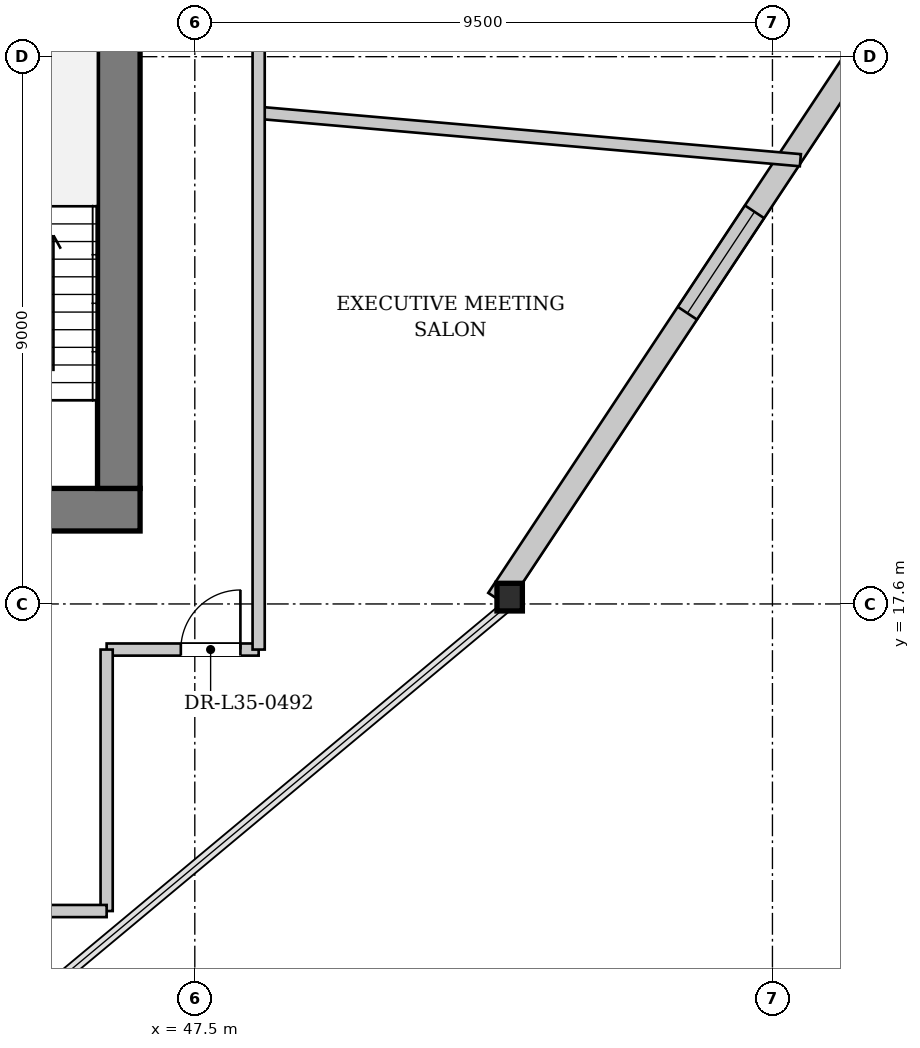
"""IFC4 building model, lengths in metres.
Left out: names, types, materials, properties, quantities, classifications, styles, units other than length and angle.
Written with IfcOpenShell. Run it as: python <this file> out.ifc"""

import sys

from ifc_helpers import new_model, si_unit, direction, frame, frame_2d, origin, origin_2d, place, context, subcontext, project, spatial, rectangle, i_section, extrude, source, transform, mapped, element, fill, save


model = new_model("IFC4")
c1 = context("Model", 3, precision=1e-05, world=origin(), true_north=direction((0.0, 1.0)))
c2 = subcontext(c1, "Body", "Model", "MODEL_VIEW")
j1 = project(units=[si_unit("LENGTHUNIT", "METRE"), si_unit("PLANEANGLEUNIT", "RADIAN")], contexts=[c1])
p1 = place(None, origin())
s1 = spatial("IfcSite", under=j1, at=p1, CompositionType="ELEMENT")
p2 = place(p1, origin())
s2 = spatial("IfcBuilding", under=s1, at=p2, CompositionType="ELEMENT")
p3 = place(p2, frame((0.0, 0.0, 134.1)))
s3 = spatial("IfcBuildingStorey", under=s2, at=p3, CompositionType="ELEMENT", Elevation=134.1)
m1 = source(origin(), c2, "Body", "SweptSolid", [
    extrude(i_section(OverallWidth=0.418, OverallDepth=0.455, WebThickness=0.038, FlangeThickness=0.059, at=origin_2d()), origin(), (0.0, 0.0, 1.0), 3.846),
])
p4 = place(p3, frame((52.643, 17.572, 0.0), z_axis=(0.018282526651, 0.073066625609, 0.997159474428), x_axis=(-0.970092901867, 0.242733932005, 0.0)))
e1 = element("IfcColumn", 1, at=p4, inside=s3, PredefinedType="COLUMN", context=c2, shape_type="MappedRepresentation", body=[
    mapped(m1, transform((0.0, 0.0, 0.0), x_axis=(1.0, 0.0, 0.0), y_axis=(0.0, 1.0, 0.0), z_axis=(0.0, 0.0, 1.0), scale=1.0)),
])
p5 = place(p3, frame((65.586, 37.457, 0.0), z_axis=(0.0, 0.0, 1.0), x_axis=(-0.552197199058, -0.833713531947, 0.0)))
e2 = element("IfcWall", 2, at=p5, inside=s3, PredefinedType="SOLIDWALL", context=c2, shape_type="SweptSolid", body=[
    extrude(rectangle(XDim=23.726, YDim=0.38, at=frame_2d((11.863, 0.0))), origin(), (0.0, 0.0, 1.0), 3.142),
])
p6 = place(p5, frame((5.643, 0.0, 0.222)))
e3 = element("IfcOpeningElement", 3, at=p6, cuts=e2, PredefinedType="OPENING", context=c2, shape_type="SweptSolid", body=[
    extrude(rectangle(XDim=2.0, YDim=2.8, at=frame_2d((1.0, 1.4))), frame((0.0, 0.2, 0.0), z_axis=(0.0, -1.0, 0.0), x_axis=(1.0, 0.0, 0.0)), (0.0, 0.0, 1.0), 0.4),
])
p7 = place(p5, frame((16.082, 0.0, 0.222)))
e4 = element("IfcOpeningElement", 4, at=p7, cuts=e2, PredefinedType="OPENING", context=c2, shape_type="SweptSolid", body=[
    extrude(rectangle(XDim=2.0, YDim=2.8, at=frame_2d((1.0, 1.4))), frame((0.0, 0.2, 0.0), z_axis=(0.0, -1.0, 0.0), x_axis=(1.0, 0.0, 0.0)), (0.0, 0.0, 1.0), 0.4),
])
p8 = place(p3, frame((46.6, 19.15, 0.0), z_axis=(0.0, 0.0, 1.0), x_axis=(-1.0, 0.0, 0.0)))
e5 = element("IfcWall", 5, at=p8, inside=s3, PredefinedType="SHEAR", context=c2, shape_type="SweptSolid", body=[
    extrude(rectangle(XDim=17.2, YDim=0.7, at=frame_2d((8.6, 0.0))), origin(), (0.0, 0.0, 1.0), 3.75),
])
p9 = place(p8, frame((4.8, 0.0, 0.0)))
e6 = element("IfcOpeningElement", 6, at=p9, cuts=e5, PredefinedType="OPENING", context=c2, shape_type="SweptSolid", body=[
    extrude(rectangle(XDim=1.12, YDim=2.25, at=frame_2d((0.56, 1.125))), frame((0.0, 0.36, 0.0), z_axis=(0.0, -1.0, 0.0), x_axis=(1.0, 0.0, 0.0)), (0.0, 0.0, 1.0), 0.72),
])
p10 = place(p8, frame((11.3, 0.0, 0.0)))
e7 = element("IfcOpeningElement", 7, at=p10, cuts=e5, PredefinedType="OPENING", context=c2, shape_type="SweptSolid", body=[
    extrude(rectangle(XDim=1.12, YDim=2.25, at=frame_2d((0.56, 1.125))), frame((0.0, 0.36, 0.0), z_axis=(0.0, -1.0, 0.0), x_axis=(1.0, 0.0, 0.0)), (0.0, 0.0, 1.0), 0.72),
])
p11 = place(p3, frame((46.25, 33.7, 0.0), z_axis=(0.0, 0.0, 1.0), x_axis=(0.0, -1.0, 0.0)))
e8 = element("IfcWall", 8, at=p11, inside=s3, PredefinedType="SHEAR", context=c2, shape_type="SweptSolid", body=[
    extrude(rectangle(XDim=14.2, YDim=0.7, at=frame_2d((7.1, 0.0))), origin(), (0.0, 0.0, 1.0), 3.75),
])
p12 = place(p11, frame((5.18, 0.0, 0.0)))
e9 = element("IfcOpeningElement", 9, at=p12, cuts=e8, PredefinedType="OPENING", context=c2, shape_type="SweptSolid", body=[
    extrude(rectangle(XDim=1.6, YDim=2.2, at=frame_2d((0.8, 1.1))), frame((0.0, 0.36, 0.0), z_axis=(0.0, -1.0, 0.0), x_axis=(1.0, 0.0, 0.0)), (0.0, 0.0, 1.0), 0.72),
])
p13 = place(p3, frame((48.55, 25.677, 0.0), z_axis=(0.0, 0.0, 1.0), x_axis=(0.996193836021, -0.087165595704, 0.0)))
e10 = element("IfcWall", 10, at=p13, inside=s3, PredefinedType="PARTITIONING", context=c2, shape_type="SweptSolid", body=[
    extrude(rectangle(XDim=8.943, YDim=0.2, at=frame_2d((4.472, 0.0))), origin(), (0.0, 0.0, 1.0), 3.75),
])
p14 = place(p3, frame((46.05, 16.85, 0.0), z_axis=(0.0, 0.0, 1.0), x_axis=(1.0, 0.0, 0.0)))
e11 = element("IfcWall", 11, at=p14, inside=s3, PredefinedType="PARTITIONING", context=c2, shape_type="SweptSolid", body=[
    extrude(rectangle(XDim=2.5, YDim=0.2, at=frame_2d((1.25, 0.0))), origin(), (0.0, 0.0, 1.0), 3.75),
])
p15 = place(p14, frame((1.22, 0.0, 0.0)))
e12 = element("IfcOpeningElement", 12, at=p15, cuts=e11, PredefinedType="OPENING", context=c2, shape_type="SweptSolid", body=[
    extrude(rectangle(XDim=0.98, YDim=2.15, at=frame_2d((0.49, 1.075))), frame((0.0, 0.11, 0.0), z_axis=(0.0, -1.0, 0.0), x_axis=(1.0, 0.0, 0.0)), (0.0, 0.0, 1.0), 0.22),
])
p16 = place(p3, frame((48.55, 16.85, 0.0), z_axis=(0.0, 0.0, 1.0), x_axis=(0.0, 1.0, 0.0)))
e13 = element("IfcWall", 13, at=p16, inside=s3, PredefinedType="PARTITIONING", context=c2, shape_type="SweptSolid", body=[
    extrude(rectangle(XDim=19.5, YDim=0.2, at=frame_2d((9.75, 0.0))), origin(), (0.0, 0.0, 1.0), 3.75),
])
p17 = place(p16, frame((13.106, 0.0, 0.0)))
e14 = element("IfcOpeningElement", 14, at=p17, cuts=e13, PredefinedType="OPENING", context=c2, shape_type="SweptSolid", body=[
    extrude(rectangle(XDim=0.98, YDim=2.15, at=frame_2d((0.49, 1.075))), frame((0.0, 0.11, 0.0), z_axis=(0.0, -1.0, 0.0), x_axis=(1.0, 0.0, 0.0)), (0.0, 0.0, 1.0), 0.22),
])
p18 = place(p3, frame((46.05, 12.55, 0.0), z_axis=(0.0, 0.0, 1.0), x_axis=(0.0, 1.0, 0.0)))
e15 = element("IfcWall", 15, at=p18, inside=s3, PredefinedType="PARTITIONING", context=c2, shape_type="SweptSolid", body=[
    extrude(rectangle(XDim=4.3, YDim=0.2, at=frame_2d((2.15, 0.0))), origin(), (0.0, 0.0, 1.0), 3.75),
])
p19 = place(p3, frame((35.95, 12.55, 0.0), z_axis=(0.0, 0.0, 1.0), x_axis=(1.0, 0.0, 0.0)))
e16 = element("IfcWall", 16, at=p19, inside=s3, PredefinedType="PARTITIONING", context=c2, shape_type="SweptSolid", body=[
    extrude(rectangle(XDim=10.1, YDim=0.2, at=frame_2d((5.05, 0.0))), origin(), (0.0, 0.0, 1.0), 3.75),
])
m2 = source(origin(), c2, "Body", "SweptSolid", [
    extrude(rectangle(XDim=2.0, YDim=2.8, at=frame_2d((1.0, 1.4))), frame((0.0, 0.03, 0.0), z_axis=(0.0, -1.0, 0.0), x_axis=(1.0, 0.0, 0.0)), (0.0, 0.0, 1.0), 0.06),
])
p20 = place(p7, origin())
e17 = element("IfcWindow", 17, at=p20, inside=s3, PartitioningType="SINGLE_PANEL", PredefinedType="WINDOW", context=c2, shape_type="MappedRepresentation", body=[
    mapped(m2, transform((0.0, 0.0, 0.0), x_axis=(1.0, 0.0, 0.0), y_axis=(0.0, 1.0, 0.0), z_axis=(0.0, 0.0, 1.0), scale=1.0)),
])
fill(e4, e17)
m3 = source(origin(), c2, "Body", "SweptSolid", [
    extrude(rectangle(XDim=0.98, YDim=2.15, at=frame_2d((0.49, 1.075))), frame((0.0, 0.025, 0.0), z_axis=(0.0, -1.0, 0.0), x_axis=(1.0, 0.0, 0.0)), (0.0, 0.0, 1.0), 0.05),
])
p21 = place(p15, origin())
e18 = element("IfcDoor", 18, at=p21, inside=s3, OperationType="SINGLE_SWING_RIGHT", PredefinedType="DOOR", context=c2, shape_type="MappedRepresentation", body=[
    mapped(m3, transform((0.0, 0.0, 0.0), x_axis=(1.0, 0.0, 0.0), y_axis=(0.0, 1.0, 0.0), z_axis=(0.0, 0.0, 1.0), scale=1.0)),
])
fill(e12, e18)
save(model, sys.argv[1])
